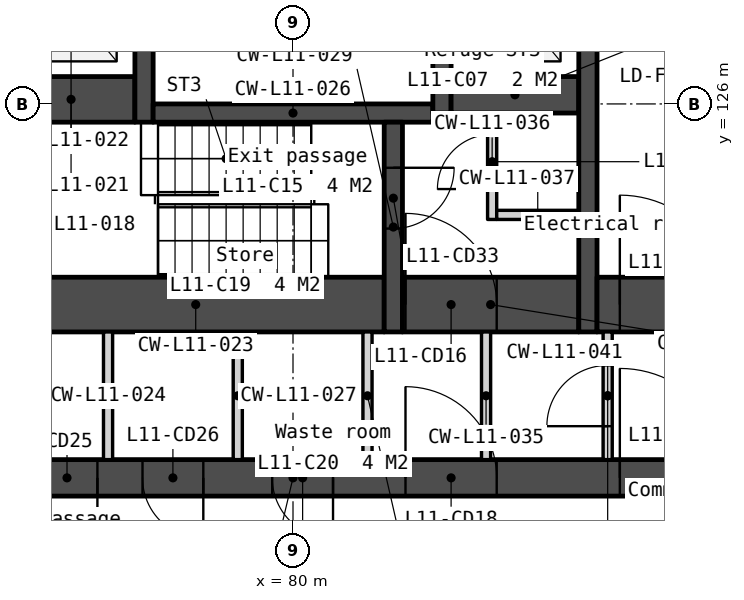
"""IFC4 building model, lengths in metres.
Left out: names, types, materials, properties, quantities, classifications, styles, units other than length and angle.
Written with IfcOpenShell. Run it as: python <this file> out.ifc"""

import sys

from ifc_helpers import new_model, si_unit, direction, frame, frame_2d, origin, place, context, subcontext, project, spatial, polyline, rectangle, outline, extrude, element, fill, save


model = new_model("IFC4")
c1 = context("Model", 3, precision=1e-05, world=origin(), true_north=direction((0.0, 1.0)))
c2 = subcontext(c1, "Body", "Model", "MODEL_VIEW")
j1 = project(units=[si_unit("LENGTHUNIT", "METRE"), si_unit("PLANEANGLEUNIT", "RADIAN")], contexts=[c1])
p1 = place(None, origin())
s1 = spatial("IfcSite", under=j1, at=p1, CompositionType="ELEMENT")
p2 = place(p1, origin())
s2 = spatial("IfcBuilding", under=s1, at=p2, CompositionType="ELEMENT")
p3 = place(p2, frame((0.0, 0.0, 52.5)))
s3 = spatial("IfcBuildingStorey", under=s2, at=p3, CompositionType="ELEMENT", Elevation=52.5)
p4 = place(p3, frame((66.0, 119.85, 0.0), z_axis=(0.0, 0.0, 1.0), x_axis=(1.0, 0.0, 0.0)))
e1 = element("IfcWall", 1, at=p4, inside=s3, PredefinedType="SOLIDWALL", context=c2, shape_type="SweptSolid", body=[
    extrude(rectangle(XDim=28.0, YDim=0.6, at=frame_2d((14.0, 0.0))), origin(), (0.0, 0.0, 1.0), 3.35),
])
p5 = place(p4, frame((6.825, 0.0, 0.0)))
e2 = element("IfcOpeningElement", 2, at=p5, cuts=e1, PredefinedType="OPENING", context=c2, shape_type="SweptSolid", body=[
    extrude(rectangle(XDim=1.8, YDim=2.1, at=frame_2d((0.9, 1.05))), frame((0.0, 0.31, 0.0), z_axis=(0.0, -1.0, 0.0), x_axis=(1.0, 0.0, 0.0)), (0.0, 0.0, 1.0), 0.62),
])
p6 = place(p4, frame((15.85, 0.0, 0.0)))
e3 = element("IfcOpeningElement", 3, at=p6, cuts=e1, PredefinedType="OPENING", context=c2, shape_type="SweptSolid", body=[
    extrude(rectangle(XDim=1.5, YDim=2.1, at=frame_2d((0.75, 1.05))), frame((0.0, 0.31, 0.0), z_axis=(0.0, -1.0, 0.0), x_axis=(1.0, 0.0, 0.0)), (0.0, 0.0, 1.0), 0.62),
])
p7 = place(p4, frame((19.375, 0.0, 0.0)))
e4 = element("IfcOpeningElement", 4, at=p7, cuts=e1, PredefinedType="OPENING", context=c2, shape_type="SweptSolid", body=[
    extrude(rectangle(XDim=1.8, YDim=2.1, at=frame_2d((0.9, 1.05))), frame((0.0, 0.31, 0.0), z_axis=(0.0, -1.0, 0.0), x_axis=(1.0, 0.0, 0.0)), (0.0, 0.0, 1.0), 0.62),
])
p8 = place(p4, frame((4.425, 0.0, 0.0)))
e5 = element("IfcOpeningElement", 5, at=p8, cuts=e1, PredefinedType="OPENING", context=c2, shape_type="SweptSolid", body=[
    extrude(rectangle(XDim=1.0, YDim=2.1, at=frame_2d((0.5, 1.05))), frame((0.0, 0.31, 0.0), z_axis=(0.0, -1.0, 0.0), x_axis=(1.0, 0.0, 0.0)), (0.0, 0.0, 1.0), 0.62),
])
p9 = place(p4, frame((9.783, 0.0, 0.0)))
e6 = element("IfcOpeningElement", 6, at=p9, cuts=e1, PredefinedType="OPENING", context=c2, shape_type="SweptSolid", body=[
    extrude(rectangle(XDim=1.0, YDim=2.1, at=frame_2d((0.5, 1.05))), frame((0.0, 0.31, 0.0), z_axis=(0.0, -1.0, 0.0), x_axis=(1.0, 0.0, 0.0)), (0.0, 0.0, 1.0), 0.62),
])
p10 = place(p4, frame((11.525, 0.0, 0.0)))
e7 = element("IfcOpeningElement", 7, at=p10, cuts=e1, PredefinedType="OPENING", context=c2, shape_type="SweptSolid", body=[
    extrude(rectangle(XDim=1.0, YDim=2.1, at=frame_2d((0.5, 1.05))), frame((0.0, 0.31, 0.0), z_axis=(0.0, -1.0, 0.0), x_axis=(1.0, 0.0, 0.0)), (0.0, 0.0, 1.0), 0.62),
])
p11 = place(p4, frame((13.658, 0.0, 0.0)))
e8 = element("IfcOpeningElement", 8, at=p11, cuts=e1, PredefinedType="OPENING", context=c2, shape_type="SweptSolid", body=[
    extrude(rectangle(XDim=1.0, YDim=2.1, at=frame_2d((0.5, 1.05))), frame((0.0, 0.31, 0.0), z_axis=(0.0, -1.0, 0.0), x_axis=(1.0, 0.0, 0.0)), (0.0, 0.0, 1.0), 0.62),
])
p12 = place(p4, frame((21.725, 0.0, 0.0)))
e9 = element("IfcOpeningElement", 9, at=p12, cuts=e1, PredefinedType="OPENING", context=c2, shape_type="SweptSolid", body=[
    extrude(rectangle(XDim=1.0, YDim=2.1, at=frame_2d((0.5, 1.05))), frame((0.0, 0.31, 0.0), z_axis=(0.0, -1.0, 0.0), x_axis=(1.0, 0.0, 0.0)), (0.0, 0.0, 1.0), 0.62),
])
p13 = place(p4, frame((23.425, 0.0, 0.0)))
e10 = element("IfcOpeningElement", 10, at=p13, cuts=e1, PredefinedType="OPENING", context=c2, shape_type="SweptSolid", body=[
    extrude(rectangle(XDim=1.0, YDim=2.1, at=frame_2d((0.5, 1.05))), frame((0.0, 0.31, 0.0), z_axis=(0.0, -1.0, 0.0), x_axis=(1.0, 0.0, 0.0)), (0.0, 0.0, 1.0), 0.62),
])
p14 = place(p3, frame((75.3, 126.075, 0.0), z_axis=(0.0, 0.0, 1.0), x_axis=(1.0, 0.0, 0.0)))
e11 = element("IfcWall", 11, at=p14, inside=s3, PredefinedType="SOLIDWALL", context=c2, shape_type="SweptSolid", body=[
    extrude(rectangle(XDim=2.1, YDim=0.75, at=frame_2d((1.05, 0.0))), origin(), (0.0, 0.0, 1.0), 3.35),
])
p15 = place(p3, frame((75.3, 122.7, 0.0), z_axis=(0.0, 0.0, 1.0), x_axis=(1.0, 0.0, 0.0)))
e12 = element("IfcWall", 12, at=p15, inside=s3, PredefinedType="SOLIDWALL", context=c2, shape_type="SweptSolid", body=[
    extrude(rectangle(XDim=6.2, YDim=0.9, at=frame_2d((3.1, 0.0))), origin(), (0.0, 0.0, 1.0), 3.35),
])
p16 = place(p3, frame((76.958, 122.25, 0.0), z_axis=(0.0, 0.0, 1.0), x_axis=(0.0, -1.0, 0.0)))
e13 = element("IfcWall", 13, at=p16, inside=s3, PredefinedType="PARTITIONING", context=c2, shape_type="SweptSolid", body=[
    extrude(rectangle(XDim=2.1, YDim=0.15, at=frame_2d((1.05, 0.0))), origin(), (0.0, 0.0, 1.0), 3.35),
])
p17 = place(p3, frame((77.55, 133.95, 0.0), z_axis=(0.0, 0.0, 1.0), x_axis=(0.0, -1.0, 0.0)))
e14 = element("IfcWall", 14, at=p17, inside=s3, PredefinedType="SOLIDWALL", context=c2, shape_type="SweptSolid", body=[
    extrude(rectangle(XDim=8.25, YDim=0.3, at=frame_2d((4.125, 0.0))), origin(), (0.0, 0.0, 1.0), 3.35),
])
p18 = place(p17, frame((0.6, 0.0, 0.0)))
e15 = element("IfcOpeningElement", 15, at=p18, cuts=e14, PredefinedType="OPENING", context=c2, shape_type="SweptSolid", body=[
    extrude(rectangle(XDim=1.1, YDim=2.1, at=frame_2d((0.55, 1.05))), frame((0.0, 0.16, 0.0), z_axis=(0.0, -1.0, 0.0), x_axis=(1.0, 0.0, 0.0)), (0.0, 0.0, 1.0), 0.32),
])
p19 = place(p17, frame((3.2, 0.0, 0.0)))
e16 = element("IfcOpeningElement", 16, at=p19, cuts=e14, PredefinedType="OPENING", context=c2, shape_type="SweptSolid", body=[
    extrude(rectangle(XDim=1.1, YDim=2.1, at=frame_2d((0.55, 1.05))), frame((0.0, 0.16, 0.0), z_axis=(0.0, -1.0, 0.0), x_axis=(1.0, 0.0, 0.0)), (0.0, 0.0, 1.0), 0.32),
])
p20 = place(p17, frame((5.8, 0.0, 0.0)))
e17 = element("IfcOpeningElement", 17, at=p20, cuts=e14, PredefinedType="OPENING", context=c2, shape_type="SweptSolid", body=[
    extrude(rectangle(XDim=1.1, YDim=2.1, at=frame_2d((0.55, 1.05))), frame((0.0, 0.16, 0.0), z_axis=(0.0, -1.0, 0.0), x_axis=(1.0, 0.0, 0.0)), (0.0, 0.0, 1.0), 0.32),
])
p21 = place(p3, frame((77.7, 125.85, 0.0), z_axis=(0.0, 0.0, 1.0), x_axis=(1.0, 0.0, 0.0)))
e18 = element("IfcWall", 18, at=p21, inside=s3, PredefinedType="SOLIDWALL", context=c2, shape_type="SweptSolid", body=[
    extrude(rectangle(XDim=4.6, YDim=0.3, at=frame_2d((2.3, 0.0))), origin(), (0.0, 0.0, 1.0), 3.35),
])
for number, where, z_axis, x_axis in (
    (19, (79.092, 122.25, 0.0), (0.0, 0.0, 1.0), (0.0, -1.0, 0.0)),
    (20, (81.225, 122.25, 0.0), (0.0, 0.0, 1.0), (0.0, -1.0, 0.0)),
):
    element("IfcWall", number, at=place(p3, frame(where, z_axis=z_axis, x_axis=x_axis)), inside=s3, PredefinedType="PARTITIONING", context=c2, shape_type="SweptSolid", body=[
        extrude(rectangle(XDim=2.1, YDim=0.15, at=frame_2d((1.05, 0.0))), origin(), (0.0, 0.0, 1.0), 3.35),
    ])
p22 = place(p3, frame((81.65, 125.7, 0.0), z_axis=(0.0, 0.0, 1.0), x_axis=(0.0, -1.0, 0.0)))
e21 = element("IfcWall", 21, at=p22, inside=s3, PredefinedType="SOLIDWALL", context=c2, shape_type="SweptSolid", body=[
    extrude(rectangle(XDim=3.45, YDim=0.3, at=frame_2d((1.725, 0.0))), origin(), (0.0, 0.0, 1.0), 3.35),
])
p23 = place(p22, frame((0.75, 0.0, 0.0)))
e22 = element("IfcOpeningElement", 22, at=p23, cuts=e21, PredefinedType="OPENING", context=c2, shape_type="SweptSolid", body=[
    extrude(rectangle(XDim=1.0, YDim=2.1, at=frame_2d((0.5, 1.05))), frame((0.0, 0.16, 0.0), z_axis=(0.0, -1.0, 0.0), x_axis=(1.0, 0.0, 0.0)), (0.0, 0.0, 1.0), 0.32),
])
p24 = place(p3, frame((81.8, 122.7, 0.0), z_axis=(0.0, 0.0, 1.0), x_axis=(1.0, 0.0, 0.0)))
e23 = element("IfcWall", 23, at=p24, inside=s3, PredefinedType="SOLIDWALL", context=c2, shape_type="SweptSolid", body=[
    extrude(rectangle(XDim=2.9, YDim=0.9, at=frame_2d((1.45, 0.0))), origin(), (0.0, 0.0, 1.0), 3.35),
])
p25 = place(p24, frame((0.05, 0.0, 0.0)))
e24 = element("IfcOpeningElement", 24, at=p25, cuts=e23, PredefinedType="OPENING", context=c2, shape_type="SweptSolid", body=[
    extrude(rectangle(XDim=1.5, YDim=2.1, at=frame_2d((0.75, 1.05))), frame((0.0, 0.46, 0.0), z_axis=(0.0, -1.0, 0.0), x_axis=(1.0, 0.0, 0.0)), (0.0, 0.0, 1.0), 0.92),
])
p26 = place(p3, frame((82.45, 133.95, 0.0), z_axis=(0.0, 0.0, 1.0), x_axis=(0.0, -1.0, 0.0)))
e25 = element("IfcWall", 25, at=p26, inside=s3, PredefinedType="SOLIDWALL", context=c2, shape_type="SweptSolid", body=[
    extrude(rectangle(XDim=8.1, YDim=0.3, at=frame_2d((4.05, 0.0))), origin(), (0.0, 0.0, 1.0), 3.35),
])
p27 = place(p26, frame((0.6, 0.0, 0.0)))
e26 = element("IfcOpeningElement", 26, at=p27, cuts=e25, PredefinedType="OPENING", context=c2, shape_type="SweptSolid", body=[
    extrude(rectangle(XDim=1.1, YDim=2.1, at=frame_2d((0.55, 1.05))), frame((0.0, 0.16, 0.0), z_axis=(0.0, -1.0, 0.0), x_axis=(1.0, 0.0, 0.0)), (0.0, 0.0, 1.0), 0.32),
])
p28 = place(p26, frame((3.2, 0.0, 0.0)))
e27 = element("IfcOpeningElement", 27, at=p28, cuts=e25, PredefinedType="OPENING", context=c2, shape_type="SweptSolid", body=[
    extrude(rectangle(XDim=1.1, YDim=2.1, at=frame_2d((0.55, 1.05))), frame((0.0, 0.16, 0.0), z_axis=(0.0, -1.0, 0.0), x_axis=(1.0, 0.0, 0.0)), (0.0, 0.0, 1.0), 0.32),
])
p29 = place(p26, frame((5.8, 0.0, 0.0)))
e28 = element("IfcOpeningElement", 28, at=p29, cuts=e25, PredefinedType="OPENING", context=c2, shape_type="SweptSolid", body=[
    extrude(rectangle(XDim=1.1, YDim=2.1, at=frame_2d((0.55, 1.05))), frame((0.0, 0.16, 0.0), z_axis=(0.0, -1.0, 0.0), x_axis=(1.0, 0.0, 0.0)), (0.0, 0.0, 1.0), 0.32),
])
p30 = place(p3, frame((82.6, 126.15, 0.0), z_axis=(0.0, 0.0, 1.0), x_axis=(1.0, 0.0, 0.0)))
e29 = element("IfcWall", 29, at=p30, inside=s3, PredefinedType="SOLIDWALL", context=c2, shape_type="SweptSolid", body=[
    extrude(rectangle(XDim=2.1, YDim=0.6, at=frame_2d((1.05, 0.0))), origin(), (0.0, 0.0, 1.0), 3.35),
])
p31 = place(p3, frame((83.175, 122.25, 0.0), z_axis=(0.0, 0.0, 1.0), x_axis=(0.0, -1.0, 0.0)))
e30 = element("IfcWall", 30, at=p31, inside=s3, PredefinedType="PARTITIONING", context=c2, shape_type="SweptSolid", body=[
    extrude(rectangle(XDim=2.1, YDim=0.15, at=frame_2d((1.05, 0.0))), origin(), (0.0, 0.0, 1.0), 3.35),
])
p32 = place(p3, frame((83.275, 125.85, 0.0), z_axis=(0.0, 0.0, 1.0), x_axis=(0.0, -1.0, 0.0)))
e31 = element("IfcWall", 31, at=p32, inside=s3, PredefinedType="PARTITIONING", context=c2, shape_type="SweptSolid", body=[
    extrude(rectangle(XDim=1.75, YDim=0.15, at=frame_2d((0.875, 0.0))), origin(), (0.0, 0.0, 1.0), 3.35),
])
p33 = place(p32, frame((0.35, 0.0, 0.0)))
e32 = element("IfcOpeningElement", 32, at=p33, cuts=e31, PredefinedType="OPENING", context=c2, shape_type="SweptSolid", body=[
    extrude(rectangle(XDim=0.9, YDim=2.1, at=frame_2d((0.45, 1.05))), frame((0.0, 0.085, 0.0), z_axis=(0.0, -1.0, 0.0), x_axis=(1.0, 0.0, 0.0)), (0.0, 0.0, 1.0), 0.17),
])
p34 = place(p3, frame((83.35, 124.175, 0.0), z_axis=(0.0, 0.0, 1.0), x_axis=(1.0, 0.0, 0.0)))
e33 = element("IfcWall", 33, at=p34, inside=s3, PredefinedType="PARTITIONING", context=c2, shape_type="SweptSolid", body=[
    extrude(rectangle(XDim=1.35, YDim=0.15, at=frame_2d((0.675, 0.0))), origin(), (0.0, 0.0, 1.0), 3.35),
])
p35 = place(p3, frame((84.85, 133.95, 0.0), z_axis=(0.0, 0.0, 1.0), x_axis=(0.0, -1.0, 0.0)))
e34 = element("IfcWall", 34, at=p35, inside=s3, PredefinedType="SOLIDWALL", context=c2, shape_type="SweptSolid", body=[
    extrude(rectangle(XDim=11.7, YDim=0.3, at=frame_2d((5.85, 0.0))), origin(), (0.0, 0.0, 1.0), 3.35),
])
p36 = place(p3, frame((85.0, 122.7, 0.0), z_axis=(0.0, 0.0, 1.0), x_axis=(1.0, 0.0, 0.0)))
e35 = element("IfcWall", 35, at=p36, inside=s3, PredefinedType="SOLIDWALL", context=c2, shape_type="SweptSolid", body=[
    extrude(rectangle(XDim=2.55, YDim=0.9, at=frame_2d((1.275, 0.0))), origin(), (0.0, 0.0, 1.0), 3.35),
])
p37 = place(p36, frame((0.375, 0.0, 0.0)))
e36 = element("IfcOpeningElement", 36, at=p37, cuts=e35, PredefinedType="OPENING", context=c2, shape_type="SweptSolid", body=[
    extrude(rectangle(XDim=1.8, YDim=2.1, at=frame_2d((0.9, 1.05))), frame((0.0, 0.46, 0.0), z_axis=(0.0, -1.0, 0.0), x_axis=(1.0, 0.0, 0.0)), (0.0, 0.0, 1.0), 0.92),
])
p38 = place(p3, frame((85.175, 122.25, 0.0), z_axis=(0.0, 0.0, 1.0), x_axis=(0.0, -1.0, 0.0)))
e37 = element("IfcWall", 37, at=p38, inside=s3, PredefinedType="PARTITIONING", context=c2, shape_type="SweptSolid", body=[
    extrude(rectangle(XDim=2.1, YDim=0.15, at=frame_2d((1.05, 0.0))), origin(), (0.0, 0.0, 1.0), 3.35),
])
p39 = place(p38, frame((0.55, 0.0, 0.0)))
e38 = element("IfcOpeningElement", 38, at=p39, cuts=e37, PredefinedType="OPENING", context=c2, shape_type="SweptSolid", body=[
    extrude(rectangle(XDim=1.0, YDim=2.1, at=frame_2d((0.5, 1.05))), frame((0.0, 0.085, 0.0), z_axis=(0.0, -1.0, 0.0), x_axis=(1.0, 0.0, 0.0)), (0.0, 0.0, 1.0), 0.17),
])
p40 = place(p3, frame((83.105, 90.599, -0.15), z_axis=(0.0, 0.0, 1.0), x_axis=(0.499999201451, 0.866025864826, 0.0)))
e39 = element("IfcWall", 39, at=p40, inside=s3, PredefinedType="SOLIDWALL", context=c2, shape_type="SweptSolid", body=[
    extrude(outline(polyline([(44.8, 0.0), (44.8, 3.5), (0.0, 3.5), (0.0, 0.0), (44.8, 0.0)])), frame((0.0, 0.225, 0.0), z_axis=(0.0, -1.0, 0.0), x_axis=(1.0, 0.0, 0.0)), (0.0, 0.0, 1.0), 0.45),
])
p41 = place(p40, frame((0.722, 0.0, 1.05)))
e40 = element("IfcOpeningElement", 40, at=p41, cuts=e39, PredefinedType="OPENING", context=c2, shape_type="SweptSolid", body=[
    extrude(rectangle(XDim=1.2, YDim=1.5, at=frame_2d((0.6, 0.75))), frame((0.0, 0.235, 0.0), z_axis=(0.0, -1.0, 0.0), x_axis=(1.0, 0.0, 0.0)), (0.0, 0.0, 1.0), 0.47),
])
p42 = place(p40, frame((7.51, 0.0, 1.05)))
e41 = element("IfcOpeningElement", 41, at=p42, cuts=e39, PredefinedType="OPENING", context=c2, shape_type="SweptSolid", body=[
    extrude(rectangle(XDim=1.2, YDim=1.5, at=frame_2d((0.6, 0.75))), frame((0.0, 0.235, 0.0), z_axis=(0.0, -1.0, 0.0), x_axis=(1.0, 0.0, 0.0)), (0.0, 0.0, 1.0), 0.47),
])
p43 = place(p40, frame((9.21, 0.0, 1.05)))
e42 = element("IfcOpeningElement", 42, at=p43, cuts=e39, PredefinedType="OPENING", context=c2, shape_type="SweptSolid", body=[
    extrude(rectangle(XDim=1.2, YDim=1.5, at=frame_2d((0.6, 0.75))), frame((0.0, 0.235, 0.0), z_axis=(0.0, -1.0, 0.0), x_axis=(1.0, 0.0, 0.0)), (0.0, 0.0, 1.0), 0.47),
])
p44 = place(p40, frame((16.47, 0.0, 1.05)))
e43 = element("IfcOpeningElement", 43, at=p44, cuts=e39, PredefinedType="OPENING", context=c2, shape_type="SweptSolid", body=[
    extrude(rectangle(XDim=1.2, YDim=1.5, at=frame_2d((0.6, 0.75))), frame((0.0, 0.235, 0.0), z_axis=(0.0, -1.0, 0.0), x_axis=(1.0, 0.0, 0.0)), (0.0, 0.0, 1.0), 0.47),
])
p45 = place(p40, frame((18.17, 0.0, 1.05)))
e44 = element("IfcOpeningElement", 44, at=p45, cuts=e39, PredefinedType="OPENING", context=c2, shape_type="SweptSolid", body=[
    extrude(rectangle(XDim=1.2, YDim=1.5, at=frame_2d((0.6, 0.75))), frame((0.0, 0.235, 0.0), z_axis=(0.0, -1.0, 0.0), x_axis=(1.0, 0.0, 0.0)), (0.0, 0.0, 1.0), 0.47),
])
p46 = place(p40, frame((25.43, 0.0, 1.05)))
e45 = element("IfcOpeningElement", 45, at=p46, cuts=e39, PredefinedType="OPENING", context=c2, shape_type="SweptSolid", body=[
    extrude(rectangle(XDim=1.2, YDim=1.5, at=frame_2d((0.6, 0.75))), frame((0.0, 0.235, 0.0), z_axis=(0.0, -1.0, 0.0), x_axis=(1.0, 0.0, 0.0)), (0.0, 0.0, 1.0), 0.47),
])
p47 = place(p40, frame((27.13, 0.0, 1.05)))
e46 = element("IfcOpeningElement", 46, at=p47, cuts=e39, PredefinedType="OPENING", context=c2, shape_type="SweptSolid", body=[
    extrude(rectangle(XDim=1.2, YDim=1.5, at=frame_2d((0.6, 0.75))), frame((0.0, 0.235, 0.0), z_axis=(0.0, -1.0, 0.0), x_axis=(1.0, 0.0, 0.0)), (0.0, 0.0, 1.0), 0.47),
])
p48 = place(p40, frame((34.39, 0.0, 1.05)))
e47 = element("IfcOpeningElement", 47, at=p48, cuts=e39, PredefinedType="OPENING", context=c2, shape_type="SweptSolid", body=[
    extrude(rectangle(XDim=1.2, YDim=1.5, at=frame_2d((0.6, 0.75))), frame((0.0, 0.235, 0.0), z_axis=(0.0, -1.0, 0.0), x_axis=(1.0, 0.0, 0.0)), (0.0, 0.0, 1.0), 0.47),
])
p49 = place(p40, frame((36.09, 0.0, 1.05)))
e48 = element("IfcOpeningElement", 48, at=p49, cuts=e39, PredefinedType="OPENING", context=c2, shape_type="SweptSolid", body=[
    extrude(rectangle(XDim=1.2, YDim=1.5, at=frame_2d((0.6, 0.75))), frame((0.0, 0.235, 0.0), z_axis=(0.0, -1.0, 0.0), x_axis=(1.0, 0.0, 0.0)), (0.0, 0.0, 1.0), 0.47),
])
p50 = place(p40, frame((42.878, 0.0, 1.05)))
e49 = element("IfcOpeningElement", 49, at=p50, cuts=e39, PredefinedType="OPENING", context=c2, shape_type="SweptSolid", body=[
    extrude(rectangle(XDim=1.2, YDim=1.5, at=frame_2d((0.6, 0.75))), frame((0.0, 0.235, 0.0), z_axis=(0.0, -1.0, 0.0), x_axis=(1.0, 0.0, 0.0)), (0.0, 0.0, 1.0), 0.47),
])
p51 = place(p37, origin())
e50 = element("IfcDoor", 50, at=p51, inside=s3, OperationType="DOUBLE_DOOR_DOUBLE_SWING", PredefinedType="DOOR", context=c2, shape_type="SweptSolid", body=[
    extrude(rectangle(XDim=1.8, YDim=2.1, at=frame_2d((0.9, 1.05))), frame((0.0, 0.025, 0.0), z_axis=(0.0, -1.0, 0.0), x_axis=(1.0, 0.0, 0.0)), (0.0, 0.0, 1.0), 0.05),
])
fill(e36, e50)
p52 = place(p25, origin())
e51 = element("IfcDoor", 51, at=p52, inside=s3, OperationType="DOUBLE_DOOR_DOUBLE_SWING", PredefinedType="DOOR", context=c2, shape_type="SweptSolid", body=[
    extrude(rectangle(XDim=1.5, YDim=2.1, at=frame_2d((0.75, 1.05))), frame((0.0, 0.025, 0.0), z_axis=(0.0, -1.0, 0.0), x_axis=(1.0, 0.0, 0.0)), (0.0, 0.0, 1.0), 0.05),
])
fill(e24, e51)
p53 = place(p6, origin())
e52 = element("IfcDoor", 52, at=p53, inside=s3, OperationType="DOUBLE_DOOR_DOUBLE_SWING", PredefinedType="DOOR", context=c2, shape_type="SweptSolid", body=[
    extrude(rectangle(XDim=1.5, YDim=2.1, at=frame_2d((0.75, 1.05))), frame((0.0, 0.025, 0.0), z_axis=(0.0, -1.0, 0.0), x_axis=(1.0, 0.0, 0.0)), (0.0, 0.0, 1.0), 0.05),
])
fill(e3, e52)
p54 = place(p7, origin())
e53 = element("IfcDoor", 53, at=p54, inside=s3, OperationType="DOUBLE_DOOR_DOUBLE_SWING", PredefinedType="DOOR", context=c2, shape_type="SweptSolid", body=[
    extrude(rectangle(XDim=1.8, YDim=2.1, at=frame_2d((0.9, 1.05))), frame((0.0, 0.025, 0.0), z_axis=(0.0, -1.0, 0.0), x_axis=(1.0, 0.0, 0.0)), (0.0, 0.0, 1.0), 0.05),
])
fill(e4, e53)
p55 = place(p33, origin())
e54 = element("IfcDoor", 54, at=p55, inside=s3, OperationType="SINGLE_SWING_RIGHT", PredefinedType="DOOR", context=c2, shape_type="SweptSolid", body=[
    extrude(rectangle(XDim=0.9, YDim=2.1, at=frame_2d((0.45, 1.05))), frame((0.0, 0.025, 0.0), z_axis=(0.0, -1.0, 0.0), x_axis=(1.0, 0.0, 0.0)), (0.0, 0.0, 1.0), 0.05),
])
fill(e32, e54)
p56 = place(p9, origin())
e55 = element("IfcDoor", 55, at=p56, inside=s3, OperationType="SINGLE_SWING_RIGHT", PredefinedType="DOOR", context=c2, shape_type="SweptSolid", body=[
    extrude(rectangle(XDim=1.0, YDim=2.1, at=frame_2d((0.5, 1.05))), frame((0.0, 0.025, 0.0), z_axis=(0.0, -1.0, 0.0), x_axis=(1.0, 0.0, 0.0)), (0.0, 0.0, 1.0), 0.05),
])
fill(e6, e55)
p57 = place(p10, origin())
e56 = element("IfcDoor", 56, at=p57, inside=s3, OperationType="SINGLE_SWING_RIGHT", PredefinedType="DOOR", context=c2, shape_type="SweptSolid", body=[
    extrude(rectangle(XDim=1.0, YDim=2.1, at=frame_2d((0.5, 1.05))), frame((0.0, 0.025, 0.0), z_axis=(0.0, -1.0, 0.0), x_axis=(1.0, 0.0, 0.0)), (0.0, 0.0, 1.0), 0.05),
])
fill(e7, e56)
p58 = place(p11, origin())
e57 = element("IfcDoor", 57, at=p58, inside=s3, OperationType="SINGLE_SWING_RIGHT", PredefinedType="DOOR", context=c2, shape_type="SweptSolid", body=[
    extrude(rectangle(XDim=1.0, YDim=2.1, at=frame_2d((0.5, 1.05))), frame((0.0, 0.025, 0.0), z_axis=(0.0, -1.0, 0.0), x_axis=(1.0, 0.0, 0.0)), (0.0, 0.0, 1.0), 0.05),
])
fill(e8, e57)
p59 = place(p39, origin())
e58 = element("IfcDoor", 58, at=p59, inside=s3, OperationType="SINGLE_SWING_RIGHT", PredefinedType="DOOR", context=c2, shape_type="SweptSolid", body=[
    extrude(rectangle(XDim=1.0, YDim=2.1, at=frame_2d((0.5, 1.05))), frame((0.0, 0.025, 0.0), z_axis=(0.0, -1.0, 0.0), x_axis=(1.0, 0.0, 0.0)), (0.0, 0.0, 1.0), 0.05),
])
fill(e38, e58)
p60 = place(p23, origin())
e59 = element("IfcDoor", 59, at=p60, inside=s3, OperationType="SINGLE_SWING_LEFT", PredefinedType="DOOR", context=c2, shape_type="SweptSolid", body=[
    extrude(rectangle(XDim=1.0, YDim=2.1, at=frame_2d((0.5, 1.05))), frame((0.0, 0.025, 0.0), z_axis=(0.0, -1.0, 0.0), x_axis=(1.0, 0.0, 0.0)), (0.0, 0.0, 1.0), 0.05),
])
fill(e22, e59)
save(model, sys.argv[1])
